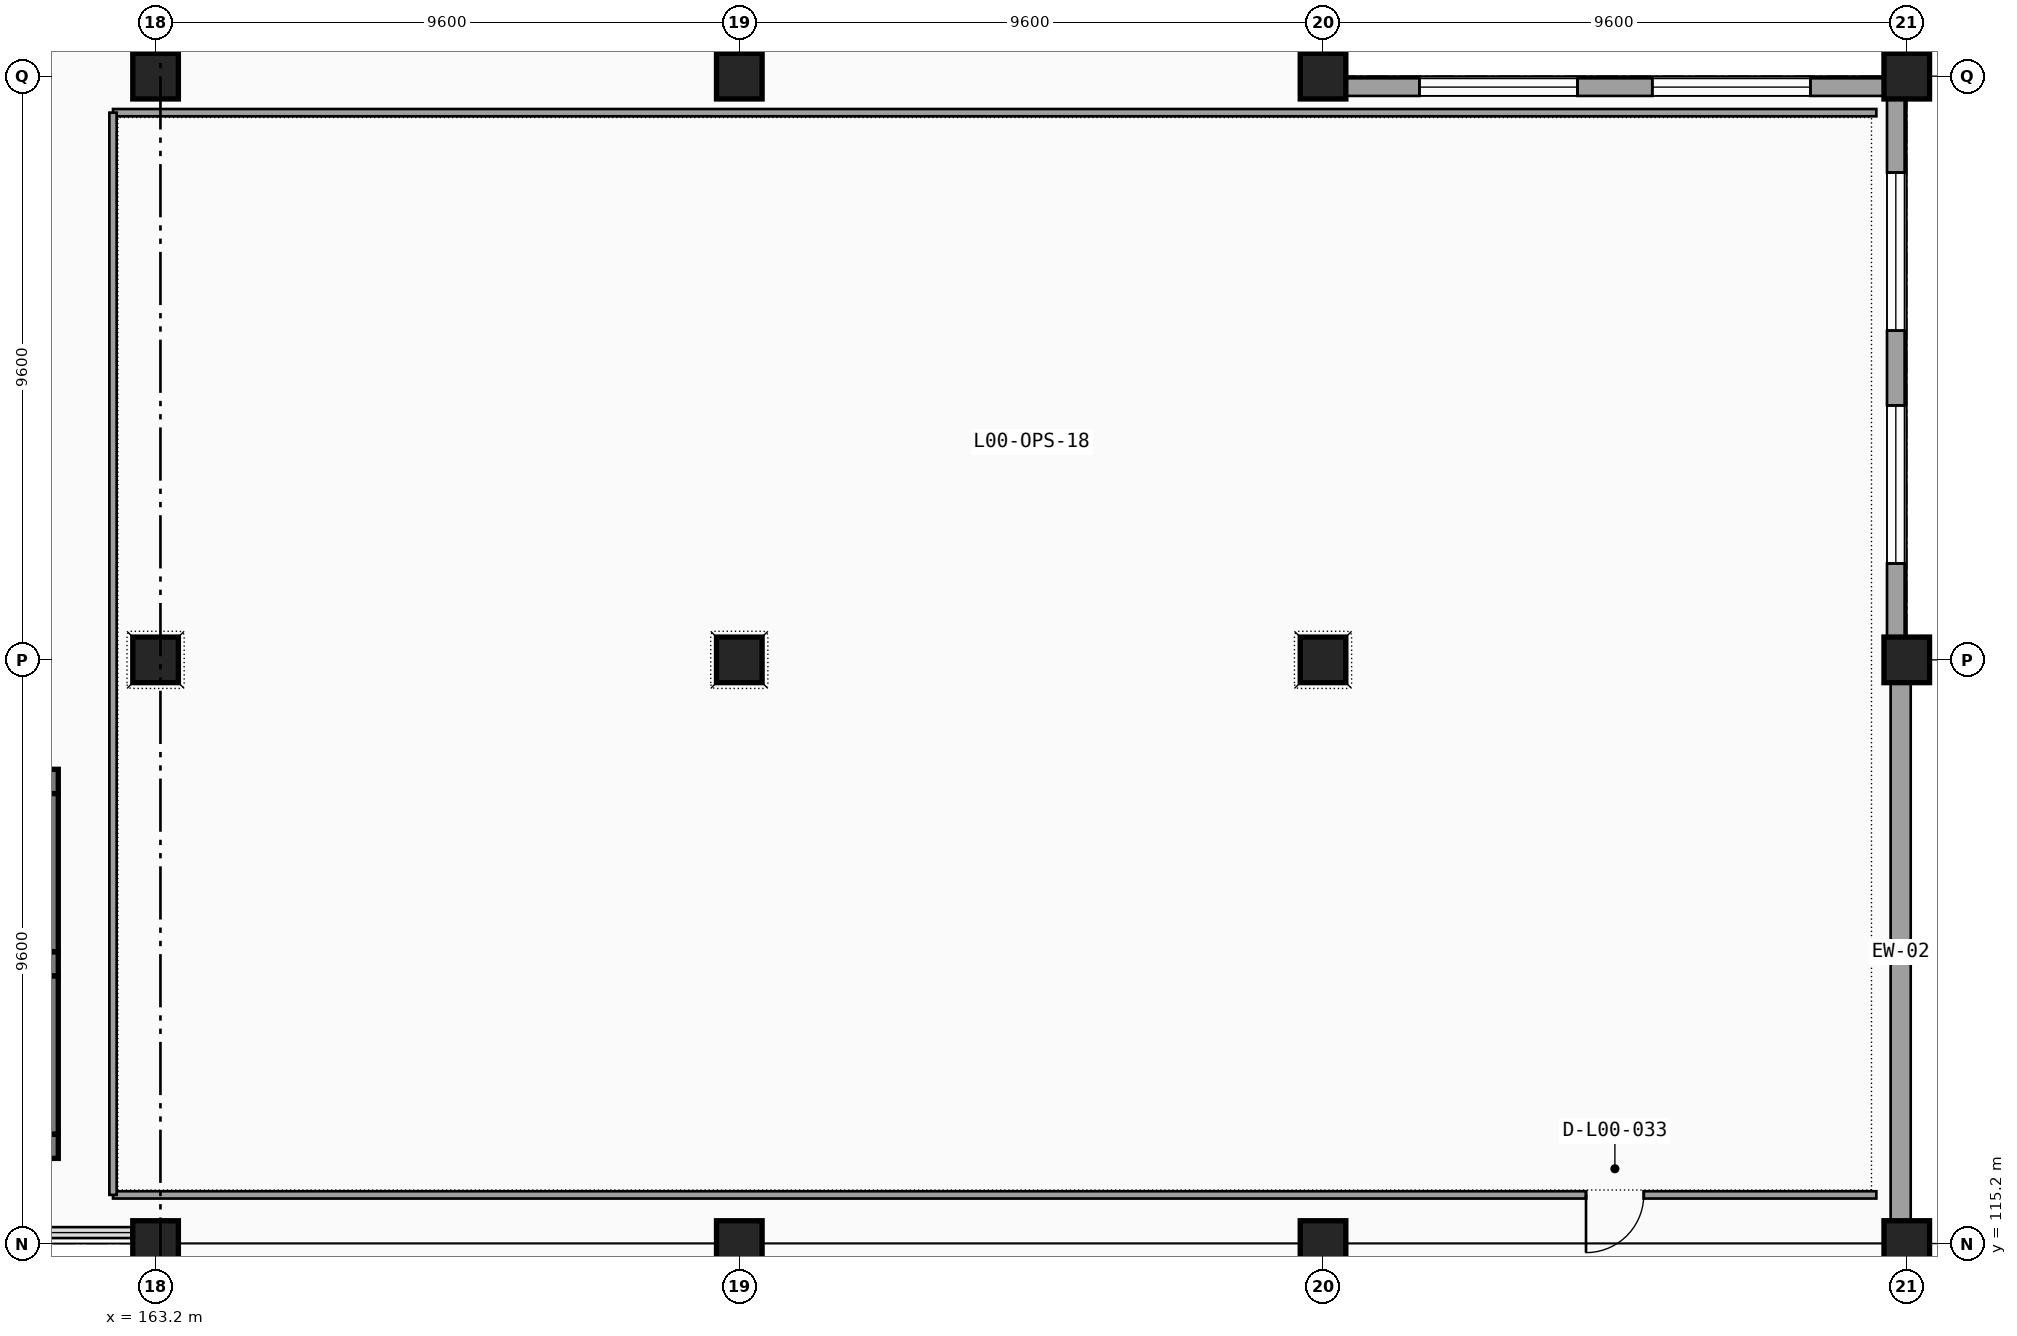
"""IFC4 building model, lengths in metres.
Left out: names, types, materials, properties, quantities, classifications, styles, units other than length and angle.
Written with IfcOpenShell. Run it as: python <this file> out.ifc"""

import sys

from ifc_helpers import new_model, si_unit, direction, frame, frame_2d, origin, origin_2d, place, context, subcontext, project, spatial, rectangle, extrude, element, fill, save


model = new_model("IFC4")
c1 = context("Model", 3, precision=1e-05, world=origin(), true_north=direction((0.0, 1.0)))
c2 = subcontext(c1, "Body", "Model", "MODEL_VIEW")
j1 = project(units=[si_unit("LENGTHUNIT", "METRE"), si_unit("PLANEANGLEUNIT", "RADIAN")], contexts=[c1])
p1 = place(None, origin())
s1 = spatial("IfcSite", under=j1, at=p1, CompositionType="ELEMENT")
p2 = place(p1, origin())
s2 = spatial("IfcBuilding", under=s1, at=p2, CompositionType="ELEMENT")
p3 = place(p2, origin())
s3 = spatial("IfcBuildingStorey", under=s2, at=p3, CompositionType="ELEMENT", Elevation=0.0)
for number, where, z_axis, x_axis in (
    (1, (163.2, 115.2, 0.0), (0.0, 0.0, 1.0), (1.0, 0.0, 0.0)),
    (2, (163.2, 124.8, 0.0), (0.0, 0.0, 1.0), (1.0, 0.0, 0.0)),
    (3, (163.2, 134.4, 0.0), (0.0, 0.0, 1.0), (1.0, 0.0, 0.0)),
    (4, (172.8, 115.2, 0.0), (0.0, 0.0, 1.0), (1.0, 0.0, 0.0)),
    (5, (172.8, 124.8, 0.0), (0.0, 0.0, 1.0), (1.0, 0.0, 0.0)),
    (6, (172.8, 134.4, 0.0), (0.0, 0.0, 1.0), (1.0, 0.0, 0.0)),
    (7, (182.4, 115.2, 0.0), (0.0, 0.0, 1.0), (1.0, 0.0, 0.0)),
    (8, (182.4, 124.8, 0.0), (0.0, 0.0, 1.0), (1.0, 0.0, 0.0)),
    (9, (182.4, 134.4, 0.0), (0.0, 0.0, 1.0), (1.0, 0.0, 0.0)),
    (10, (192.0, 115.2, 0.0), (0.0, 0.0, 1.0), (1.0, 0.0, 0.0)),
    (11, (192.0, 124.8, 0.0), (0.0, 0.0, 1.0), (1.0, 0.0, 0.0)),
    (12, (192.0, 134.4, 0.0), (0.0, 0.0, 1.0), (1.0, 0.0, 0.0)),
):
    element("IfcColumn", number, at=place(p3, frame(where, z_axis=z_axis, x_axis=x_axis)), inside=s3, PredefinedType="COLUMN", context=c2, shape_type="SweptSolid", body=[
        extrude(rectangle(XDim=0.75, YDim=0.75, at=origin_2d()), origin(), (0.0, 0.0, 1.0), 4.8),
    ])
p4 = place(p3, frame((191.9, 115.555, 0.0), z_axis=(0.0, 0.0, 1.0), x_axis=(0.0, 1.0, 0.0)))
e13 = element("IfcWall", 13, at=p4, inside=s3, PredefinedType="SOLIDWALL", context=c2, shape_type="SweptSolid", body=[
    extrude(rectangle(XDim=8.89, YDim=0.33, at=frame_2d((4.445, 0.0))), origin(), (0.0, 0.0, 1.0), 3.573),
])
p5 = place(p3, frame((191.82, 125.155, 0.0), z_axis=(0.0, 0.0, 1.0), x_axis=(0.0, 1.0, 0.0)))
e14 = element("IfcWall", 14, at=p5, inside=s3, PredefinedType="SOLIDWALL", context=c2, shape_type="SweptSolid", body=[
    extrude(rectangle(XDim=8.89, YDim=0.29, at=frame_2d((4.445, 0.0))), origin(), (0.0, 0.0, 1.0), 3.75),
])
p6 = place(p5, frame((3.83, 0.0, 1.0), z_axis=(0.0, 0.0, 1.0), x_axis=(-1.0, 0.0, 0.0)))
e15 = element("IfcOpeningElement", 15, at=p6, cuts=e14, PredefinedType="OPENING", context=c2, shape_type="SweptSolid", body=[
    extrude(rectangle(XDim=2.6, YDim=2.0, at=frame_2d((1.3, 1.0))), frame((0.0, 0.155, 0.0), z_axis=(0.0, -1.0, 0.0), x_axis=(1.0, 0.0, 0.0)), (0.0, 0.0, 1.0), 0.31),
])
p7 = place(p5, frame((7.66, 0.0, 1.0), z_axis=(0.0, 0.0, 1.0), x_axis=(-1.0, 0.0, 0.0)))
e16 = element("IfcOpeningElement", 16, at=p7, cuts=e14, PredefinedType="OPENING", context=c2, shape_type="SweptSolid", body=[
    extrude(rectangle(XDim=2.6, YDim=2.0, at=frame_2d((1.3, 1.0))), frame((0.0, 0.155, 0.0), z_axis=(0.0, -1.0, 0.0), x_axis=(1.0, 0.0, 0.0)), (0.0, 0.0, 1.0), 0.31),
])
p8 = place(p3, frame((191.645, 134.22, 0.0), z_axis=(0.0, 0.0, 1.0), x_axis=(-1.0, 0.0, 0.0)))
e17 = element("IfcWall", 17, at=p8, inside=s3, PredefinedType="SOLIDWALL", context=c2, shape_type="SweptSolid", body=[
    extrude(rectangle(XDim=8.89, YDim=0.29, at=frame_2d((4.445, 0.0))), origin(), (0.0, 0.0, 1.0), 3.664),
])
p9 = place(p8, frame((3.83, 0.0, 1.0), z_axis=(0.0, 0.0, 1.0), x_axis=(-1.0, 0.0, 0.0)))
e18 = element("IfcOpeningElement", 18, at=p9, cuts=e17, PredefinedType="OPENING", context=c2, shape_type="SweptSolid", body=[
    extrude(rectangle(XDim=2.6, YDim=2.0, at=frame_2d((1.3, 1.0))), frame((0.0, 0.155, 0.0), z_axis=(0.0, -1.0, 0.0), x_axis=(1.0, 0.0, 0.0)), (0.0, 0.0, 1.0), 0.31),
])
p10 = place(p8, frame((7.66, 0.0, 1.0), z_axis=(0.0, 0.0, 1.0), x_axis=(-1.0, 0.0, 0.0)))
e19 = element("IfcOpeningElement", 19, at=p10, cuts=e17, PredefinedType="OPENING", context=c2, shape_type="SweptSolid", body=[
    extrude(rectangle(XDim=2.6, YDim=2.0, at=frame_2d((1.3, 1.0))), frame((0.0, 0.155, 0.0), z_axis=(0.0, -1.0, 0.0), x_axis=(1.0, 0.0, 0.0)), (0.0, 0.0, 1.0), 0.31),
])
p11 = place(p3, frame((182.22, 134.755, 0.0), z_axis=(0.0, 0.0, 1.0), x_axis=(0.0, 1.0, 0.0)))
e20 = element("IfcWall", 20, at=p11, inside=s3, PredefinedType="SOLIDWALL", context=c2, shape_type="SweptSolid", body=[
    extrude(rectangle(XDim=8.89, YDim=0.29, at=frame_2d((4.445, 0.0))), origin(), (0.0, 0.0, 1.0), 3.7),
])
p12 = place(p11, frame((3.83, 0.0, 1.0), z_axis=(0.0, 0.0, 1.0), x_axis=(-1.0, 0.0, 0.0)))
e21 = element("IfcOpeningElement", 21, at=p12, cuts=e20, PredefinedType="OPENING", context=c2, shape_type="SweptSolid", body=[
    extrude(rectangle(XDim=2.6, YDim=2.0, at=frame_2d((1.3, 1.0))), frame((0.0, 0.155, 0.0), z_axis=(0.0, -1.0, 0.0), x_axis=(1.0, 0.0, 0.0)), (0.0, 0.0, 1.0), 0.31),
])
p13 = place(p11, frame((7.66, 0.0, 1.0), z_axis=(0.0, 0.0, 1.0), x_axis=(-1.0, 0.0, 0.0)))
e22 = element("IfcOpeningElement", 22, at=p13, cuts=e20, PredefinedType="OPENING", context=c2, shape_type="SweptSolid", body=[
    extrude(rectangle(XDim=2.6, YDim=2.0, at=frame_2d((1.3, 1.0))), frame((0.0, 0.155, 0.0), z_axis=(0.0, -1.0, 0.0), x_axis=(1.0, 0.0, 0.0)), (0.0, 0.0, 1.0), 0.31),
])
for number, where, z_axis, x_axis in (
    (23, (158.4, 116.8, 0.0), (0.0, 0.0, 1.0), (1.0, 0.0, 0.0)),
    (24, (161.6, 119.8, 0.0), (0.0, 0.0, 1.0), (-1.0, 0.0, 0.0)),
):
    element("IfcWall", number, at=place(p3, frame(where, z_axis=z_axis, x_axis=x_axis)), inside=s3, PredefinedType="SHEAR", context=c2, shape_type="SweptSolid", body=[
        extrude(rectangle(XDim=3.2, YDim=0.4, at=frame_2d((1.6, 0.0))), origin(), (0.0, 0.0, 1.0), 4.5),
    ])
p14 = place(p3, frame((161.4, 117.0, 0.0), z_axis=(0.0, 0.0, 1.0), x_axis=(0.0, 1.0, 0.0)))
e25 = element("IfcWall", 25, at=p14, inside=s3, PredefinedType="SHEAR", context=c2, shape_type="SweptSolid", body=[
    extrude(rectangle(XDim=2.6, YDim=0.4, at=frame_2d((1.3, 0.0))), origin(), (0.0, 0.0, 1.0), 4.5),
])
p15 = place(p3, frame((161.6, 122.8, 0.0), z_axis=(0.0, 0.0, 1.0), x_axis=(-1.0, 0.0, 0.0)))
e26 = element("IfcWall", 26, at=p15, inside=s3, PredefinedType="SHEAR", context=c2, shape_type="SweptSolid", body=[
    extrude(rectangle(XDim=3.2, YDim=0.4, at=frame_2d((1.6, 0.0))), origin(), (0.0, 0.0, 1.0), 4.5),
])
p16 = place(p3, frame((161.4, 120.0, 0.0), z_axis=(0.0, 0.0, 1.0), x_axis=(0.0, 1.0, 0.0)))
e27 = element("IfcWall", 27, at=p16, inside=s3, PredefinedType="SHEAR", context=c2, shape_type="SweptSolid", body=[
    extrude(rectangle(XDim=2.6, YDim=0.4, at=frame_2d((1.3, 0.0))), origin(), (0.0, 0.0, 1.0), 4.5),
])
p17 = place(p3, frame((162.5, 133.8, 0.0), z_axis=(0.0, 0.0, 1.0), x_axis=(1.0, 0.0, 0.0)))
e28 = element("IfcWall", 28, at=p17, inside=s3, PredefinedType="PARTITIONING", context=c2, shape_type="SweptSolid", body=[
    extrude(rectangle(XDim=29.0, YDim=0.12, at=frame_2d((14.5, 0.0))), origin(), (0.0, 0.0, 1.0), 3.7),
])
p18 = place(p3, frame((191.5, 116.0, 0.0), z_axis=(0.0, 0.0, 1.0), x_axis=(-1.0, 0.0, 0.0)))
e29 = element("IfcWall", 29, at=p18, inside=s3, PredefinedType="PARTITIONING", context=c2, shape_type="SweptSolid", body=[
    extrude(rectangle(XDim=29.0, YDim=0.12, at=frame_2d((14.5, 0.0))), origin(), (0.0, 0.0, 1.0), 3.573),
])
p19 = place(p18, frame((3.825, 0.0, 0.0), z_axis=(0.0, 0.0, 1.0), x_axis=(1.0, 0.0, 0.0)))
e30 = element("IfcOpeningElement", 30, at=p19, cuts=e29, PredefinedType="OPENING", context=c2, shape_type="SweptSolid", body=[
    extrude(rectangle(XDim=0.95, YDim=2.15, at=frame_2d((0.475, 1.075))), frame((0.0, 0.07, 0.0), z_axis=(0.0, -1.0, 0.0), x_axis=(1.0, 0.0, 0.0)), (0.0, 0.0, 1.0), 0.14),
])
p20 = place(p3, frame((162.5, 116.0, 0.0), z_axis=(0.0, 0.0, 1.0), x_axis=(0.0, 1.0, 0.0)))
e31 = element("IfcWall", 31, at=p20, inside=s3, PredefinedType="PARTITIONING", context=c2, shape_type="SweptSolid", body=[
    extrude(rectangle(XDim=17.8, YDim=0.12, at=frame_2d((8.9, 0.0))), origin(), (0.0, 0.0, 1.0), 3.664),
])
p21 = place(p6, origin())
e32 = element("IfcWindow", 32, at=p21, inside=s3, PartitioningType="SINGLE_PANEL", PredefinedType="WINDOW", context=c2, shape_type="SweptSolid", body=[
    extrude(rectangle(XDim=2.6, YDim=2.0, at=frame_2d((1.3, 1.0))), frame((0.0, 0.03, 0.0), z_axis=(0.0, -1.0, 0.0), x_axis=(1.0, 0.0, 0.0)), (0.0, 0.0, 1.0), 0.06),
])
fill(e15, e32)
p22 = place(p7, origin())
e33 = element("IfcWindow", 33, at=p22, inside=s3, PartitioningType="SINGLE_PANEL", PredefinedType="WINDOW", context=c2, shape_type="SweptSolid", body=[
    extrude(rectangle(XDim=2.6, YDim=2.0, at=frame_2d((1.3, 1.0))), frame((0.0, 0.03, 0.0), z_axis=(0.0, -1.0, 0.0), x_axis=(1.0, 0.0, 0.0)), (0.0, 0.0, 1.0), 0.06),
])
fill(e16, e33)
p23 = place(p9, origin())
e34 = element("IfcWindow", 34, at=p23, inside=s3, PartitioningType="SINGLE_PANEL", PredefinedType="WINDOW", context=c2, shape_type="SweptSolid", body=[
    extrude(rectangle(XDim=2.6, YDim=2.0, at=frame_2d((1.3, 1.0))), frame((0.0, 0.03, 0.0), z_axis=(0.0, -1.0, 0.0), x_axis=(1.0, 0.0, 0.0)), (0.0, 0.0, 1.0), 0.06),
])
fill(e18, e34)
p24 = place(p10, origin())
e35 = element("IfcWindow", 35, at=p24, inside=s3, PartitioningType="SINGLE_PANEL", PredefinedType="WINDOW", context=c2, shape_type="SweptSolid", body=[
    extrude(rectangle(XDim=2.6, YDim=2.0, at=frame_2d((1.3, 1.0))), frame((0.0, 0.03, 0.0), z_axis=(0.0, -1.0, 0.0), x_axis=(1.0, 0.0, 0.0)), (0.0, 0.0, 1.0), 0.06),
])
fill(e19, e35)
p25 = place(p19, origin())
e36 = element("IfcDoor", 36, at=p25, inside=s3, OperationType="SINGLE_SWING_RIGHT", PredefinedType="DOOR", context=c2, shape_type="SweptSolid", body=[
    extrude(rectangle(XDim=0.95, YDim=2.15, at=frame_2d((0.475, 1.075))), frame((0.0, 0.025, 0.0), z_axis=(0.0, -1.0, 0.0), x_axis=(1.0, 0.0, 0.0)), (0.0, 0.0, 1.0), 0.05),
])
fill(e30, e36)
save(model, sys.argv[1])
